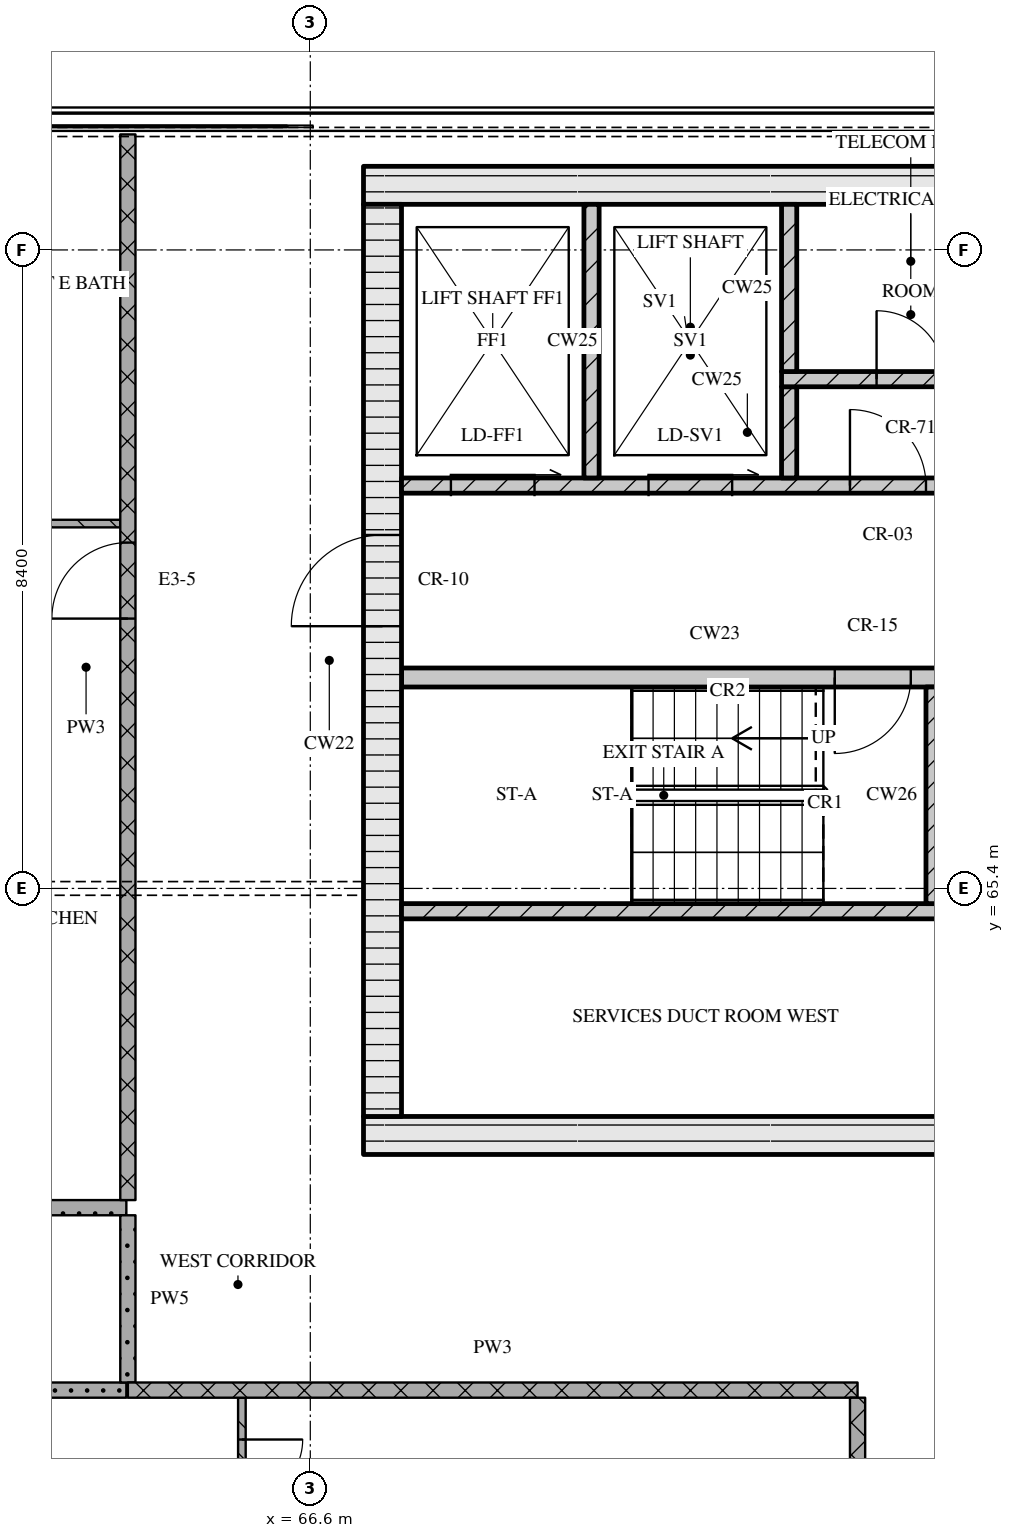
"""IFC4 building model, lengths in metres.
Left out: names, types, materials, properties, quantities, classifications, styles, units other than length and angle.
Written with IfcOpenShell. Run it as: python <this file> out.ifc"""

import sys

from ifc_helpers import new_model, si_unit, direction, frame, frame_2d, origin, place, context, subcontext, project, spatial, rectangle, extrude, element, fill, save


model = new_model("IFC4")
c1 = context("Model", 3, precision=1e-05, world=origin(), true_north=direction((0.0, 1.0)))
c2 = subcontext(c1, "Body", "Model", "MODEL_VIEW")
j1 = project(units=[si_unit("LENGTHUNIT", "METRE"), si_unit("PLANEANGLEUNIT", "RADIAN")], contexts=[c1])
p1 = place(None, origin())
s1 = spatial("IfcSite", under=j1, at=p1, CompositionType="ELEMENT")
p2 = place(p1, origin())
s2 = spatial("IfcBuilding", under=s1, at=p2, CompositionType="ELEMENT")
p3 = place(p2, frame((0.0, 0.0, 277.95)))
s3 = spatial("IfcBuildingStorey", under=s2, at=p3, CompositionType="ELEMENT", Elevation=277.95)
p4 = place(p3, frame((67.3, 62.15, 0.0), z_axis=(0.0, 0.0, 1.0), x_axis=(1.0, 0.0, 0.0)))
e1 = element("IfcWall", 1, at=p4, inside=s3, PredefinedType="SOLIDWALL", context=c2, shape_type="SweptSolid", body=[
    extrude(rectangle(XDim=40.6, YDim=0.5, at=frame_2d((20.3, 0.0))), origin(), (0.0, 0.0, 1.0), 3.32),
])
p5 = place(p4, frame((20.65, 0.0, 0.0)))
e2 = element("IfcOpeningElement", 2, at=p5, cuts=e1, PredefinedType="OPENING", context=c2, shape_type="SweptSolid", body=[
    extrude(rectangle(XDim=1.8, YDim=2.1, at=frame_2d((0.9, 1.05))), frame((0.0, 0.26, 0.0), z_axis=(0.0, -1.0, 0.0), x_axis=(1.0, 0.0, 0.0)), (0.0, 0.0, 1.0), 0.52),
])
p6 = place(p3, frame((67.3, 74.65, 0.0), z_axis=(0.0, 0.0, 1.0), x_axis=(1.0, 0.0, 0.0)))
e3 = element("IfcWall", 3, at=p6, inside=s3, PredefinedType="SOLIDWALL", context=c2, shape_type="SweptSolid", body=[
    extrude(rectangle(XDim=40.6, YDim=0.5, at=frame_2d((20.3, 0.0))), origin(), (0.0, 0.0, 1.0), 3.32),
])
p7 = place(p3, frame((67.55, 62.4, 0.0), z_axis=(0.0, 0.0, 1.0), x_axis=(0.0, 1.0, 0.0)))
e4 = element("IfcWall", 4, at=p7, inside=s3, PredefinedType="SOLIDWALL", context=c2, shape_type="SweptSolid", body=[
    extrude(rectangle(XDim=12.0, YDim=0.5, at=frame_2d((6.0, 0.0))), origin(), (0.0, 0.0, 1.0), 3.32),
])
p8 = place(p7, frame((6.45, 0.0, 0.0)))
e5 = element("IfcOpeningElement", 5, at=p8, cuts=e4, PredefinedType="OPENING", context=c2, shape_type="SweptSolid", body=[
    extrude(rectangle(XDim=1.2, YDim=2.1, at=frame_2d((0.6, 1.05))), frame((0.0, 0.26, 0.0), z_axis=(0.0, -1.0, 0.0), x_axis=(1.0, 0.0, 0.0)), (0.0, 0.0, 1.0), 0.52),
])
p9 = place(p3, frame((67.8, 65.1, 0.0), z_axis=(0.0, 0.0, 1.0), x_axis=(1.0, 0.0, 0.0)))
e6 = element("IfcWall", 6, at=p9, inside=s3, PredefinedType="SOLIDWALL", context=c2, shape_type="SweptSolid", body=[
    extrude(rectangle(XDim=18.5, YDim=0.2, at=frame_2d((9.25, 0.0))), origin(), (0.0, 0.0, 1.0), 3.32),
])
p10 = place(p9, frame((7.27, 0.0, 0.0)))
e7 = element("IfcOpeningElement", 7, at=p10, cuts=e6, PredefinedType="OPENING", context=c2, shape_type="SweptSolid", body=[
    extrude(rectangle(XDim=0.9, YDim=2.1, at=frame_2d((0.45, 1.05))), frame((0.0, 0.11, 0.0), z_axis=(0.0, -1.0, 0.0), x_axis=(1.0, 0.0, 0.0)), (0.0, 0.0, 1.0), 0.22),
])
p11 = place(p9, frame((9.05, 0.0, 0.0)))
e8 = element("IfcOpeningElement", 8, at=p11, cuts=e6, PredefinedType="OPENING", context=c2, shape_type="SweptSolid", body=[
    extrude(rectangle(XDim=0.9, YDim=2.1, at=frame_2d((0.45, 1.05))), frame((0.0, 0.11, 0.0), z_axis=(0.0, -1.0, 0.0), x_axis=(1.0, 0.0, 0.0)), (0.0, 0.0, 1.0), 0.22),
])
p12 = place(p9, frame((12.76, 0.0, 0.0)))
e9 = element("IfcOpeningElement", 9, at=p12, cuts=e6, PredefinedType="OPENING", context=c2, shape_type="SweptSolid", body=[
    extrude(rectangle(XDim=0.9, YDim=2.1, at=frame_2d((0.45, 1.05))), frame((0.0, 0.11, 0.0), z_axis=(0.0, -1.0, 0.0), x_axis=(1.0, 0.0, 0.0)), (0.0, 0.0, 1.0), 0.22),
])
p13 = place(p9, frame((16.7, 0.0, 0.0)))
e10 = element("IfcOpeningElement", 10, at=p13, cuts=e6, PredefinedType="OPENING", context=c2, shape_type="SweptSolid", body=[
    extrude(rectangle(XDim=0.9, YDim=2.1, at=frame_2d((0.45, 1.05))), frame((0.0, 0.11, 0.0), z_axis=(0.0, -1.0, 0.0), x_axis=(1.0, 0.0, 0.0)), (0.0, 0.0, 1.0), 0.22),
])
p14 = place(p3, frame((74.85, 65.2, 0.0), z_axis=(0.0, 0.0, 1.0), x_axis=(0.0, 1.0, 0.0)))
e11 = element("IfcWall", 11, at=p14, inside=s3, PredefinedType="SOLIDWALL", context=c2, shape_type="SweptSolid", body=[
    extrude(rectangle(XDim=2.85, YDim=0.3, at=frame_2d((1.425, 0.0))), origin(), (0.0, 0.0, 1.0), 3.32),
])
p15 = place(p3, frame((67.8, 68.175, 0.0), z_axis=(0.0, 0.0, 1.0), x_axis=(1.0, 0.0, 0.0)))
e12 = element("IfcWall", 12, at=p15, inside=s3, PredefinedType="SOLIDWALL", context=c2, shape_type="SweptSolid", body=[
    extrude(rectangle(XDim=8.25, YDim=0.25, at=frame_2d((4.125, 0.0))), origin(), (0.0, 0.0, 1.0), 3.32),
])
p16 = place(p15, frame((5.7, 0.0, 0.0)))
e13 = element("IfcOpeningElement", 13, at=p16, cuts=e12, PredefinedType="OPENING", context=c2, shape_type="SweptSolid", body=[
    extrude(rectangle(XDim=1.0, YDim=2.1, at=frame_2d((0.5, 1.05))), frame((0.0, 0.135, 0.0), z_axis=(0.0, -1.0, 0.0), x_axis=(1.0, 0.0, 0.0)), (0.0, 0.0, 1.0), 0.27),
])
p17 = place(p15, frame((7.2, 0.0, 0.0)))
e14 = element("IfcOpeningElement", 14, at=p17, cuts=e12, PredefinedType="OPENING", context=c2, shape_type="SweptSolid", body=[
    extrude(rectangle(XDim=0.8, YDim=2.1, at=frame_2d((0.4, 1.05))), frame((0.0, 0.135, 0.0), z_axis=(0.0, -1.0, 0.0), x_axis=(1.0, 0.0, 0.0)), (0.0, 0.0, 1.0), 0.27),
])
p18 = place(p3, frame((67.8, 70.7, 0.0), z_axis=(0.0, 0.0, 1.0), x_axis=(1.0, 0.0, 0.0)))
e15 = element("IfcWall", 15, at=p18, inside=s3, PredefinedType="SOLIDWALL", context=c2, shape_type="SweptSolid", body=[
    extrude(rectangle(XDim=39.6, YDim=0.2, at=frame_2d((19.8, 0.0))), origin(), (0.0, 0.0, 1.0), 3.32),
])
p19 = place(p18, frame((0.65, 0.0, 0.0)))
e16 = element("IfcOpeningElement", 16, at=p19, cuts=e15, PredefinedType="OPENING", context=c2, shape_type="SweptSolid", body=[
    extrude(rectangle(XDim=1.1, YDim=2.1, at=frame_2d((0.55, 1.05))), frame((0.0, 0.11, 0.0), z_axis=(0.0, -1.0, 0.0), x_axis=(1.0, 0.0, 0.0)), (0.0, 0.0, 1.0), 0.22),
])
p20 = place(p18, frame((3.25, 0.0, 0.0)))
e17 = element("IfcOpeningElement", 17, at=p20, cuts=e15, PredefinedType="OPENING", context=c2, shape_type="SweptSolid", body=[
    extrude(rectangle(XDim=1.1, YDim=2.1, at=frame_2d((0.55, 1.05))), frame((0.0, 0.11, 0.0), z_axis=(0.0, -1.0, 0.0), x_axis=(1.0, 0.0, 0.0)), (0.0, 0.0, 1.0), 0.22),
])
p21 = place(p18, frame((5.9, 0.0, 0.0)))
e18 = element("IfcOpeningElement", 18, at=p21, cuts=e15, PredefinedType="OPENING", context=c2, shape_type="SweptSolid", body=[
    extrude(rectangle(XDim=1.0, YDim=2.1, at=frame_2d((0.5, 1.05))), frame((0.0, 0.11, 0.0), z_axis=(0.0, -1.0, 0.0), x_axis=(1.0, 0.0, 0.0)), (0.0, 0.0, 1.0), 0.22),
])
p22 = place(p18, frame((21.7, 0.0, 0.0)))
e19 = element("IfcOpeningElement", 19, at=p22, cuts=e15, PredefinedType="OPENING", context=c2, shape_type="SweptSolid", body=[
    extrude(rectangle(XDim=1.0, YDim=2.1, at=frame_2d((0.5, 1.05))), frame((0.0, 0.11, 0.0), z_axis=(0.0, -1.0, 0.0), x_axis=(1.0, 0.0, 0.0)), (0.0, 0.0, 1.0), 0.22),
])
p23 = place(p18, frame((32.7, 0.0, 0.0)))
e20 = element("IfcOpeningElement", 20, at=p23, cuts=e15, PredefinedType="OPENING", context=c2, shape_type="SweptSolid", body=[
    extrude(rectangle(XDim=1.0, YDim=2.1, at=frame_2d((0.5, 1.05))), frame((0.0, 0.11, 0.0), z_axis=(0.0, -1.0, 0.0), x_axis=(1.0, 0.0, 0.0)), (0.0, 0.0, 1.0), 0.22),
])
p24 = place(p18, frame((35.25, 0.0, 0.0)))
e21 = element("IfcOpeningElement", 21, at=p24, cuts=e15, PredefinedType="OPENING", context=c2, shape_type="SweptSolid", body=[
    extrude(rectangle(XDim=1.1, YDim=2.1, at=frame_2d((0.55, 1.05))), frame((0.0, 0.11, 0.0), z_axis=(0.0, -1.0, 0.0), x_axis=(1.0, 0.0, 0.0)), (0.0, 0.0, 1.0), 0.22),
])
p25 = place(p18, frame((37.85, 0.0, 0.0)))
e22 = element("IfcOpeningElement", 22, at=p25, cuts=e15, PredefinedType="OPENING", context=c2, shape_type="SweptSolid", body=[
    extrude(rectangle(XDim=1.1, YDim=2.1, at=frame_2d((0.55, 1.05))), frame((0.0, 0.11, 0.0), z_axis=(0.0, -1.0, 0.0), x_axis=(1.0, 0.0, 0.0)), (0.0, 0.0, 1.0), 0.22),
])
p26 = place(p3, frame((70.3, 70.8, 0.0), z_axis=(0.0, 0.0, 1.0), x_axis=(0.0, 1.0, 0.0)))
e23 = element("IfcWall", 23, at=p26, inside=s3, PredefinedType="SOLIDWALL", context=c2, shape_type="SweptSolid", body=[
    extrude(rectangle(XDim=3.6, YDim=0.2, at=frame_2d((1.8, 0.0))), origin(), (0.0, 0.0, 1.0), 3.32),
])
p27 = place(p3, frame((72.9, 70.8, 0.0), z_axis=(0.0, 0.0, 1.0), x_axis=(0.0, 1.0, 0.0)))
e24 = element("IfcWall", 24, at=p27, inside=s3, PredefinedType="SOLIDWALL", context=c2, shape_type="SweptSolid", body=[
    extrude(rectangle(XDim=1.2, YDim=0.2, at=frame_2d((0.6, 0.0))), origin(), (0.0, 0.0, 1.0), 3.32),
])
p28 = place(p3, frame((72.8, 72.1, 0.0), z_axis=(0.0, 0.0, 1.0), x_axis=(1.0, 0.0, 0.0)))
e25 = element("IfcWall", 25, at=p28, inside=s3, PredefinedType="SOLIDWALL", context=c2, shape_type="SweptSolid", body=[
    extrude(rectangle(XDim=7.72, YDim=0.2, at=frame_2d((3.86, 0.0))), origin(), (0.0, 0.0, 1.0), 3.32),
])
p29 = place(p28, frame((1.25, 0.0, 0.0)))
e26 = element("IfcOpeningElement", 26, at=p29, cuts=e25, PredefinedType="OPENING", context=c2, shape_type="SweptSolid", body=[
    extrude(rectangle(XDim=0.9, YDim=2.1, at=frame_2d((0.45, 1.05))), frame((0.0, 0.11, 0.0), z_axis=(0.0, -1.0, 0.0), x_axis=(1.0, 0.0, 0.0)), (0.0, 0.0, 1.0), 0.22),
])
p30 = place(p28, frame((4.2, 0.0, 0.0)))
e27 = element("IfcOpeningElement", 27, at=p30, cuts=e25, PredefinedType="OPENING", context=c2, shape_type="SweptSolid", body=[
    extrude(rectangle(XDim=0.9, YDim=2.1, at=frame_2d((0.45, 1.05))), frame((0.0, 0.11, 0.0), z_axis=(0.0, -1.0, 0.0), x_axis=(1.0, 0.0, 0.0)), (0.0, 0.0, 1.0), 0.22),
])
p31 = place(p28, frame((6.36, 0.0, 0.0)))
e28 = element("IfcOpeningElement", 28, at=p31, cuts=e25, PredefinedType="OPENING", context=c2, shape_type="SweptSolid", body=[
    extrude(rectangle(XDim=0.9, YDim=2.1, at=frame_2d((0.45, 1.05))), frame((0.0, 0.11, 0.0), z_axis=(0.0, -1.0, 0.0), x_axis=(1.0, 0.0, 0.0)), (0.0, 0.0, 1.0), 0.22),
])
p32 = place(p3, frame((72.9, 72.2, 0.0), z_axis=(0.0, 0.0, 1.0), x_axis=(0.0, 1.0, 0.0)))
e29 = element("IfcWall", 29, at=p32, inside=s3, PredefinedType="SOLIDWALL", context=c2, shape_type="SweptSolid", body=[
    extrude(rectangle(XDim=2.2, YDim=0.2, at=frame_2d((1.1, 0.0))), origin(), (0.0, 0.0, 1.0), 3.32),
])
p33 = place(p3, frame((64.2, 58.8, 0.0), z_axis=(0.0, 0.0, 1.0), x_axis=(1.0, 0.0, 0.0)))
e30 = element("IfcWall", 30, at=p33, inside=s3, PredefinedType="PARTITIONING", context=c2, shape_type="SweptSolid", body=[
    extrude(rectangle(XDim=9.6, YDim=0.2, at=frame_2d((4.8, 0.0))), origin(), (0.0, 0.0, 1.0), 3.32),
])
p34 = place(p3, frame((56.7, 58.8, 0.0), z_axis=(0.0, 0.0, 1.0), x_axis=(1.0, 0.0, 0.0)))
e31 = element("IfcWall", 31, at=p34, inside=s3, PredefinedType="PARTITIONING", context=c2, shape_type="SweptSolid", body=[
    extrude(rectangle(XDim=7.48, YDim=0.2, at=frame_2d((3.74, 0.0))), origin(), (0.0, 0.0, 1.0), 3.32),
])
p35 = place(p3, frame((61.52, 61.2, 0.0), z_axis=(0.0, 0.0, 1.0), x_axis=(1.0, 0.0, 0.0)))
e32 = element("IfcWall", 32, at=p35, inside=s3, PredefinedType="PARTITIONING", context=c2, shape_type="SweptSolid", body=[
    extrude(rectangle(XDim=2.66, YDim=0.2, at=frame_2d((1.33, 0.0))), origin(), (0.0, 0.0, 1.0), 3.32),
])
p36 = place(p3, frame((61.5, 70.2, 0.0), z_axis=(0.0, 0.0, 1.0), x_axis=(1.0, 0.0, 0.0)))
e33 = element("IfcWall", 33, at=p36, inside=s3, PredefinedType="PARTITIONING", context=c2, shape_type="SweptSolid", body=[
    extrude(rectangle(XDim=2.6, YDim=0.1, at=frame_2d((1.3, 0.0))), origin(), (0.0, 0.0, 1.0), 3.32),
])
p37 = place(p3, frame((64.2, 61.3, 0.0), z_axis=(0.0, 0.0, 1.0), x_axis=(0.0, 1.0, 0.0)))
e34 = element("IfcWall", 34, at=p37, inside=s3, PredefinedType="PARTITIONING", context=c2, shape_type="SweptSolid", body=[
    extrude(rectangle(XDim=14.02, YDim=0.2, at=frame_2d((7.01, 0.0))), origin(), (0.0, 0.0, 1.0), 3.32),
])
p38 = place(p37, frame((7.65, 0.0, 0.0)))
e35 = element("IfcOpeningElement", 35, at=p38, cuts=e34, PredefinedType="OPENING", context=c2, shape_type="SweptSolid", body=[
    extrude(rectangle(XDim=1.0, YDim=2.1, at=frame_2d((0.5, 1.05))), frame((0.0, 0.11, 0.0), z_axis=(0.0, -1.0, 0.0), x_axis=(1.0, 0.0, 0.0)), (0.0, 0.0, 1.0), 0.22),
])
p39 = place(p3, frame((64.2, 61.1, 0.0), z_axis=(0.0, 0.0, 1.0), x_axis=(0.0, -1.0, 0.0)))
e36 = element("IfcWall", 36, at=p39, inside=s3, PredefinedType="PARTITIONING", context=c2, shape_type="SweptSolid", body=[
    extrude(rectangle(XDim=2.2, YDim=0.2, at=frame_2d((1.1, 0.0))), origin(), (0.0, 0.0, 1.0), 3.32),
])
p40 = place(p3, frame((65.7, 58.7, 0.0), z_axis=(0.0, 0.0, 1.0), x_axis=(0.0, -1.0, 0.0)))
e37 = element("IfcWall", 37, at=p40, inside=s3, PredefinedType="PARTITIONING", context=c2, shape_type="SweptSolid", body=[
    extrude(rectangle(XDim=2.25, YDim=0.1, at=frame_2d((1.125, 0.0))), origin(), (0.0, 0.0, 1.0), 3.32),
])
p41 = place(p40, frame((0.55, 0.0, 0.0)))
e38 = element("IfcOpeningElement", 38, at=p41, cuts=e37, PredefinedType="OPENING", context=c2, shape_type="SweptSolid", body=[
    extrude(rectangle(XDim=0.8, YDim=2.1, at=frame_2d((0.4, 1.05))), frame((0.0, 0.06, 0.0), z_axis=(0.0, -1.0, 0.0), x_axis=(1.0, 0.0, 0.0)), (0.0, 0.0, 1.0), 0.12),
])
p42 = place(p3, frame((73.8, 50.7, 0.0), z_axis=(0.0, 0.0, 1.0), x_axis=(0.0, 1.0, 0.0)))
e39 = element("IfcWall", 39, at=p42, inside=s3, PredefinedType="PARTITIONING", context=c2, shape_type="SweptSolid", body=[
    extrude(rectangle(XDim=8.0, YDim=0.2, at=frame_2d((4.0, 0.0))), origin(), (0.0, 0.0, 1.0), 3.32),
])
p43 = place(p42, frame((4.45, 0.0, 0.0)))
e40 = element("IfcOpeningElement", 40, at=p43, cuts=e39, PredefinedType="OPENING", context=c2, shape_type="SweptSolid", body=[
    extrude(rectangle(XDim=1.0, YDim=2.1, at=frame_2d((0.5, 1.05))), frame((0.0, 0.11, 0.0), z_axis=(0.0, -1.0, 0.0), x_axis=(1.0, 0.0, 0.0)), (0.0, 0.0, 1.0), 0.22),
])
p44 = place(p16, origin())
e41 = element("IfcDoor", 41, at=p44, inside=s3, OperationType="SINGLE_SWING_RIGHT", PredefinedType="DOOR", context=c2, shape_type="SweptSolid", body=[
    extrude(rectangle(XDim=1.0, YDim=2.1, at=frame_2d((0.5, 1.05))), frame((0.0, 0.025, 0.0), z_axis=(0.0, -1.0, 0.0), x_axis=(1.0, 0.0, 0.0)), (0.0, 0.0, 1.0), 0.05),
])
fill(e13, e41)
p45 = place(p8, origin())
e42 = element("IfcDoor", 42, at=p45, inside=s3, OperationType="SINGLE_SWING_LEFT", PredefinedType="DOOR", context=c2, shape_type="SweptSolid", body=[
    extrude(rectangle(XDim=1.2, YDim=2.1, at=frame_2d((0.6, 1.05))), frame((0.0, 0.025, 0.0), z_axis=(0.0, -1.0, 0.0), x_axis=(1.0, 0.0, 0.0)), (0.0, 0.0, 1.0), 0.05),
])
fill(e5, e42)
p46 = place(p19, origin())
e43 = element("IfcDoor", 43, at=p46, inside=s3, OperationType="SLIDING_TO_RIGHT", PredefinedType="DOOR", context=c2, shape_type="SweptSolid", body=[
    extrude(rectangle(XDim=1.1, YDim=2.1, at=frame_2d((0.55, 1.05))), frame((0.0, 0.025, 0.0), z_axis=(0.0, -1.0, 0.0), x_axis=(1.0, 0.0, 0.0)), (0.0, 0.0, 1.0), 0.05),
])
fill(e16, e43)
p47 = place(p20, origin())
e44 = element("IfcDoor", 44, at=p47, inside=s3, OperationType="SLIDING_TO_RIGHT", PredefinedType="DOOR", context=c2, shape_type="SweptSolid", body=[
    extrude(rectangle(XDim=1.1, YDim=2.1, at=frame_2d((0.55, 1.05))), frame((0.0, 0.025, 0.0), z_axis=(0.0, -1.0, 0.0), x_axis=(1.0, 0.0, 0.0)), (0.0, 0.0, 1.0), 0.05),
])
fill(e17, e44)
p48 = place(p21, origin())
e45 = element("IfcDoor", 45, at=p48, inside=s3, OperationType="SINGLE_SWING_LEFT", PredefinedType="DOOR", context=c2, shape_type="SweptSolid", body=[
    extrude(rectangle(XDim=1.0, YDim=2.1, at=frame_2d((0.5, 1.05))), frame((0.0, 0.025, 0.0), z_axis=(0.0, -1.0, 0.0), x_axis=(1.0, 0.0, 0.0)), (0.0, 0.0, 1.0), 0.05),
])
fill(e18, e45)
p49 = place(p29, origin())
e46 = element("IfcDoor", 46, at=p49, inside=s3, OperationType="SINGLE_SWING_LEFT", PredefinedType="DOOR", context=c2, shape_type="SweptSolid", body=[
    extrude(rectangle(XDim=0.9, YDim=2.1, at=frame_2d((0.45, 1.05))), frame((0.0, 0.025, 0.0), z_axis=(0.0, -1.0, 0.0), x_axis=(1.0, 0.0, 0.0)), (0.0, 0.0, 1.0), 0.05),
])
fill(e26, e46)
p50 = place(p38, origin())
e47 = element("IfcDoor", 47, at=p50, inside=s3, OperationType="SINGLE_SWING_LEFT", PredefinedType="DOOR", context=c2, shape_type="SweptSolid", body=[
    extrude(rectangle(XDim=1.0, YDim=2.1, at=frame_2d((0.5, 1.05))), frame((0.0, 0.025, 0.0), z_axis=(0.0, -1.0, 0.0), x_axis=(1.0, 0.0, 0.0)), (0.0, 0.0, 1.0), 0.05),
])
fill(e35, e47)
p51 = place(p41, origin())
e48 = element("IfcDoor", 48, at=p51, inside=s3, OperationType="SINGLE_SWING_LEFT", PredefinedType="DOOR", context=c2, shape_type="SweptSolid", body=[
    extrude(rectangle(XDim=0.8, YDim=2.1, at=frame_2d((0.4, 1.05))), frame((0.0, 0.025, 0.0), z_axis=(0.0, -1.0, 0.0), x_axis=(1.0, 0.0, 0.0)), (0.0, 0.0, 1.0), 0.05),
])
fill(e38, e48)
save(model, sys.argv[1])
